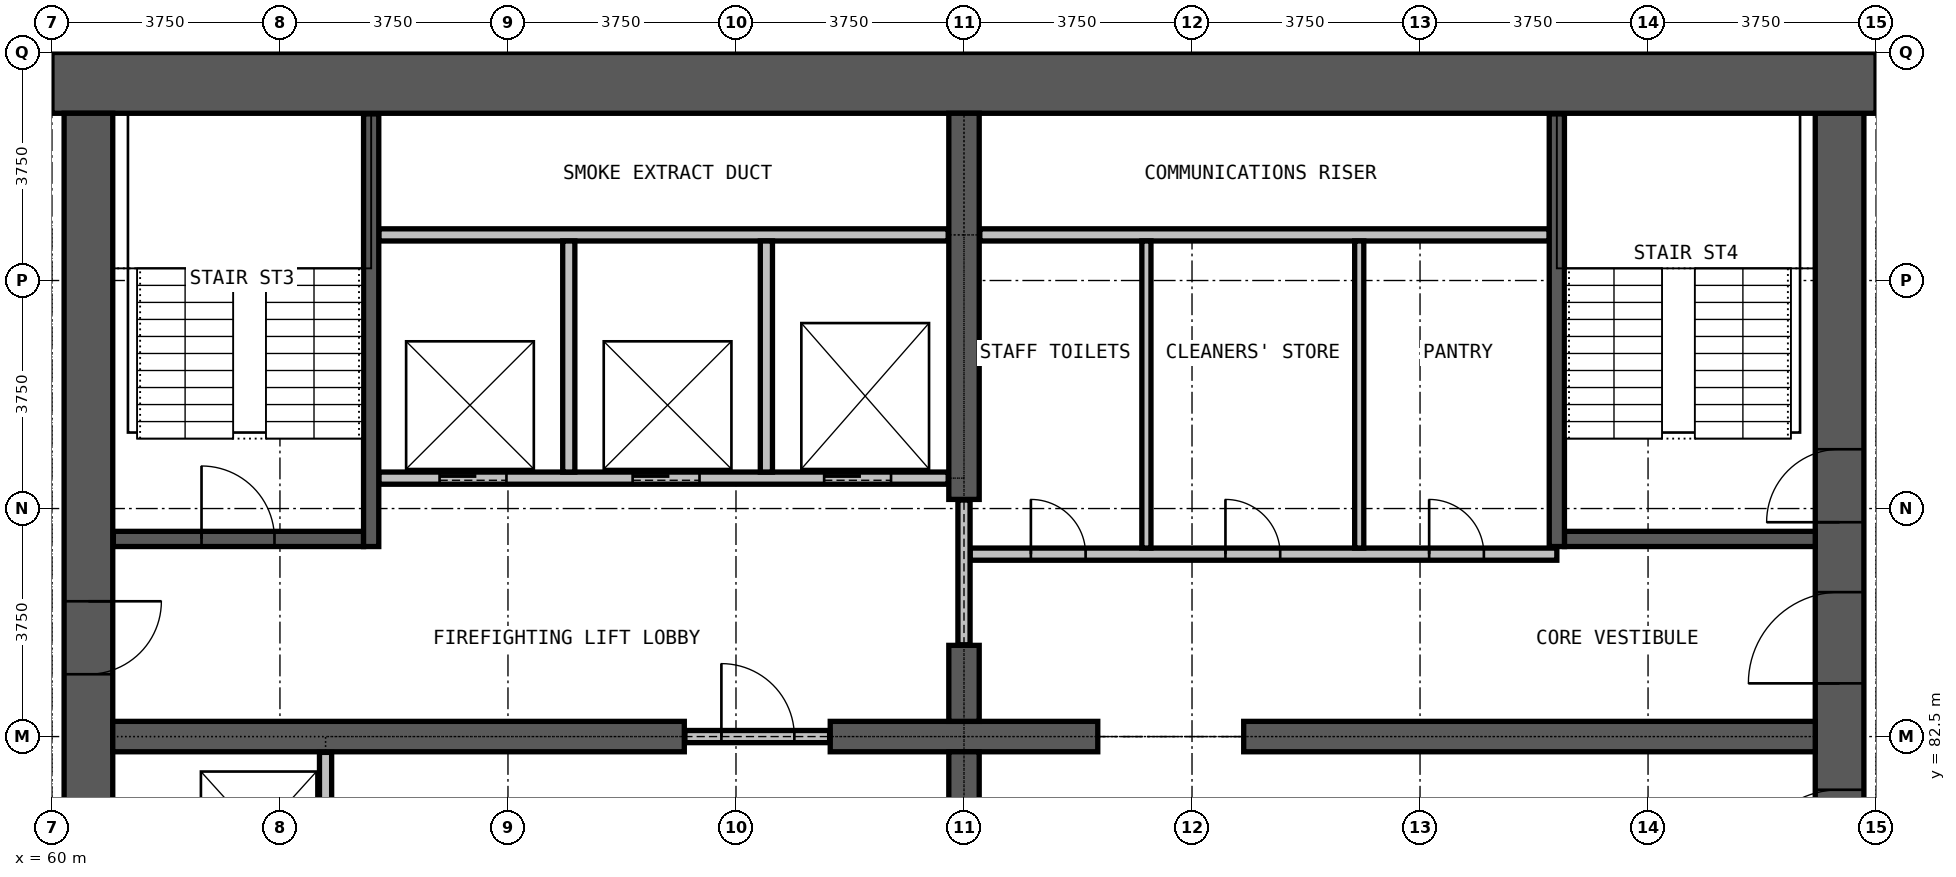
"""IFC4 building model, lengths in metres.
Left out: names, types, materials, properties, quantities, classifications, styles, units other than length and angle.
Written with IfcOpenShell. Run it as: python <this file> out.ifc"""

import sys

from ifc_helpers import new_model, si_unit, direction, frame, frame_2d, origin, place, context, subcontext, project, spatial, rectangle, extrude, element, fill, save


model = new_model("IFC4")
c1 = context("Model", 3, precision=1e-05, world=origin(), true_north=direction((0.0, 1.0)))
c2 = subcontext(c1, "Body", "Model", "MODEL_VIEW")
j1 = project(units=[si_unit("LENGTHUNIT", "METRE"), si_unit("PLANEANGLEUNIT", "RADIAN")], contexts=[c1])
p1 = place(None, origin())
s1 = spatial("IfcSite", under=j1, at=p1, CompositionType="ELEMENT")
p2 = place(p1, origin())
s2 = spatial("IfcBuilding", under=s1, at=p2, CompositionType="ELEMENT")
p3 = place(p2, frame((0.0, 0.0, 125.2)))
s3 = spatial("IfcBuildingStorey", under=s2, at=p3, CompositionType="ELEMENT", Elevation=125.2)
p4 = place(p3, frame((89.4, 72.25, 0.0), z_axis=(0.0, 0.0, 1.0), x_axis=(0.0, 1.0, 0.0)))
e1 = element("IfcWall", 1, at=p4, inside=s3, PredefinedType="SHEAR", context=c2, shape_type="SweptSolid", body=[
    extrude(rectangle(XDim=20.5, YDim=0.8, at=frame_2d((10.25, 0.0))), origin(), (0.0, 0.0, 1.0), 3.6),
])
p5 = place(p4, frame((0.275, 0.0, 0.0)))
e2 = element("IfcOpeningElement", 2, at=p5, cuts=e1, PredefinedType="OPENING", context=c2, shape_type="SweptSolid", body=[
    extrude(rectangle(XDim=1.2, YDim=2.2, at=frame_2d((0.6, 1.1))), frame((0.0, 0.41, 0.0), z_axis=(0.0, -1.0, 0.0), x_axis=(1.0, 0.0, 0.0)), (0.0, 0.0, 1.0), 0.82),
])
p6 = place(p4, frame((13.775, 0.0, 0.0)))
e3 = element("IfcOpeningElement", 3, at=p6, cuts=e1, PredefinedType="OPENING", context=c2, shape_type="SweptSolid", body=[
    extrude(rectangle(XDim=1.2, YDim=2.2, at=frame_2d((0.6, 1.1))), frame((0.0, 0.41, 0.0), z_axis=(0.0, -1.0, 0.0), x_axis=(1.0, 0.0, 0.0)), (0.0, 0.0, 1.0), 0.82),
])
p7 = place(p4, frame((7.875, 0.0, 0.0)))
e4 = element("IfcOpeningElement", 4, at=p7, cuts=e1, PredefinedType="OPENING", context=c2, shape_type="SweptSolid", body=[
    extrude(rectangle(XDim=1.5, YDim=2.2, at=frame_2d((0.75, 1.1))), frame((0.0, 0.41, 0.0), z_axis=(0.0, -1.0, 0.0), x_axis=(1.0, 0.0, 0.0)), (0.0, 0.0, 1.0), 0.82),
])
p8 = place(p4, frame((11.125, 0.0, 0.0)))
e5 = element("IfcOpeningElement", 5, at=p8, cuts=e1, PredefinedType="OPENING", context=c2, shape_type="SweptSolid", body=[
    extrude(rectangle(XDim=1.5, YDim=2.2, at=frame_2d((0.75, 1.1))), frame((0.0, 0.41, 0.0), z_axis=(0.0, -1.0, 0.0), x_axis=(1.0, 0.0, 0.0)), (0.0, 0.0, 1.0), 0.82),
])
p9 = place(p3, frame((90.0, 93.25, 0.0), z_axis=(0.0, 0.0, 1.0), x_axis=(-1.0, 0.0, 0.0)))
e6 = element("IfcWall", 6, at=p9, inside=s3, PredefinedType="SHEAR", context=c2, shape_type="SweptSolid", body=[
    extrude(rectangle(XDim=30.0, YDim=1.0, at=frame_2d((15.0, 0.0))), origin(), (0.0, 0.0, 1.0), 3.6),
])
p10 = place(p3, frame((60.6, 92.75, 0.0), z_axis=(0.0, 0.0, 1.0), x_axis=(0.0, -1.0, 0.0)))
e7 = element("IfcWall", 7, at=p10, inside=s3, PredefinedType="SHEAR", context=c2, shape_type="SweptSolid", body=[
    extrude(rectangle(XDim=20.5, YDim=0.8, at=frame_2d((10.25, 0.0))), origin(), (0.0, 0.0, 1.0), 3.6),
])
p11 = place(p10, frame((19.025, 0.0, 0.0)))
e8 = element("IfcOpeningElement", 8, at=p11, cuts=e7, PredefinedType="OPENING", context=c2, shape_type="SweptSolid", body=[
    extrude(rectangle(XDim=1.2, YDim=2.2, at=frame_2d((0.6, 1.1))), frame((0.0, 0.41, 0.0), z_axis=(0.0, -1.0, 0.0), x_axis=(1.0, 0.0, 0.0)), (0.0, 0.0, 1.0), 0.82),
])
p12 = place(p10, frame((8.025, 0.0, 0.0)))
e9 = element("IfcOpeningElement", 9, at=p12, cuts=e7, PredefinedType="OPENING", context=c2, shape_type="SweptSolid", body=[
    extrude(rectangle(XDim=1.2, YDim=2.2, at=frame_2d((0.6, 1.1))), frame((0.0, 0.41, 0.0), z_axis=(0.0, -1.0, 0.0), x_axis=(1.0, 0.0, 0.0)), (0.0, 0.0, 1.0), 0.82),
])
p13 = place(p3, frame((61.0, 82.5, 0.0), z_axis=(0.0, 0.0, 1.0), x_axis=(1.0, 0.0, 0.0)))
e10 = element("IfcWall", 10, at=p13, inside=s3, PredefinedType="SHEAR", context=c2, shape_type="SweptSolid", body=[
    extrude(rectangle(XDim=9.4, YDim=0.5, at=frame_2d((4.7, 0.0))), origin(), (0.0, 0.0, 1.0), 3.6),
])
p14 = place(p3, frame((72.8, 82.5, 0.0), z_axis=(0.0, 0.0, 1.0), x_axis=(1.0, 0.0, 0.0)))
e11 = element("IfcWall", 11, at=p14, inside=s3, PredefinedType="SHEAR", context=c2, shape_type="SweptSolid", body=[
    extrude(rectangle(XDim=4.4, YDim=0.5, at=frame_2d((2.2, 0.0))), origin(), (0.0, 0.0, 1.0), 3.6),
])
p15 = place(p3, frame((79.6, 82.5, 0.0), z_axis=(0.0, 0.0, 1.0), x_axis=(1.0, 0.0, 0.0)))
e12 = element("IfcWall", 12, at=p15, inside=s3, PredefinedType="SHEAR", context=c2, shape_type="SweptSolid", body=[
    extrude(rectangle(XDim=9.4, YDim=0.5, at=frame_2d((4.7, 0.0))), origin(), (0.0, 0.0, 1.0), 3.6),
])
for number, where, z_axis, x_axis in (
    (13, (75.0, 81.0, 0.0), (0.0, 0.0, 1.0), (0.0, 1.0, 0.0)),
    (14, (75.0, 82.75, 0.0), (0.0, 0.0, 1.0), (0.0, 1.0, 0.0)),
):
    element("IfcWall", number, at=place(p3, frame(where, z_axis=z_axis, x_axis=x_axis)), inside=s3, PredefinedType="SHEAR", context=c2, shape_type="SweptSolid", body=[
        extrude(rectangle(XDim=1.25, YDim=0.5, at=frame_2d((0.625, 0.0))), origin(), (0.0, 0.0, 1.0), 3.6),
    ])
p16 = place(p3, frame((75.0, 86.4, 0.0), z_axis=(0.0, 0.0, 1.0), x_axis=(0.0, 1.0, 0.0)))
e15 = element("IfcWall", 15, at=p16, inside=s3, PredefinedType="SHEAR", context=c2, shape_type="SweptSolid", body=[
    extrude(rectangle(XDim=6.35, YDim=0.5, at=frame_2d((3.175, 0.0))), origin(), (0.0, 0.0, 1.0), 3.6),
])
p17 = place(p3, frame((70.41, 82.5, 0.0), z_axis=(0.0, 0.0, 1.0), x_axis=(1.0, 0.0, 0.0)))
e16 = element("IfcWall", 16, at=p17, inside=s3, PredefinedType="PARTITIONING", context=c2, shape_type="SweptSolid", body=[
    extrude(rectangle(XDim=2.38, YDim=0.2, at=frame_2d((1.19, 0.0))), origin(), (0.0, 0.0, 1.0), 2.4),
])
p18 = place(p17, frame((0.6, 0.0, 0.0)))
e17 = element("IfcOpeningElement", 17, at=p18, cuts=e16, PredefinedType="OPENING", context=c2, shape_type="SweptSolid", body=[
    extrude(rectangle(XDim=1.2, YDim=2.2, at=frame_2d((0.6, 1.1))), frame((0.0, 0.11, 0.0), z_axis=(0.0, -1.0, 0.0), x_axis=(1.0, 0.0, 0.0)), (0.0, 0.0, 1.0), 0.22),
])
p19 = place(p3, frame((75.1, 85.5, 0.0), z_axis=(0.0, 0.0, 1.0), x_axis=(1.0, 0.0, 0.0)))
e18 = element("IfcWall", 18, at=p19, inside=s3, PredefinedType="PARTITIONING", context=c2, shape_type="SweptSolid", body=[
    extrude(rectangle(XDim=9.65, YDim=0.2, at=frame_2d((4.825, 0.0))), origin(), (0.0, 0.0, 1.0), 3.3),
])
p20 = place(p19, frame((1.0, 0.0, 0.0)))
e19 = element("IfcOpeningElement", 19, at=p20, cuts=e18, PredefinedType="OPENING", context=c2, shape_type="SweptSolid", body=[
    extrude(rectangle(XDim=0.9, YDim=2.2, at=frame_2d((0.45, 1.1))), frame((0.0, 0.11, 0.0), z_axis=(0.0, -1.0, 0.0), x_axis=(1.0, 0.0, 0.0)), (0.0, 0.0, 1.0), 0.22),
])
p21 = place(p19, frame((4.2, 0.0, 0.0)))
e20 = element("IfcOpeningElement", 20, at=p21, cuts=e18, PredefinedType="OPENING", context=c2, shape_type="SweptSolid", body=[
    extrude(rectangle(XDim=0.9, YDim=2.2, at=frame_2d((0.45, 1.1))), frame((0.0, 0.11, 0.0), z_axis=(0.0, -1.0, 0.0), x_axis=(1.0, 0.0, 0.0)), (0.0, 0.0, 1.0), 0.22),
])
p22 = place(p19, frame((7.55, 0.0, 0.0)))
e21 = element("IfcOpeningElement", 21, at=p22, cuts=e18, PredefinedType="OPENING", context=c2, shape_type="SweptSolid", body=[
    extrude(rectangle(XDim=0.9, YDim=2.2, at=frame_2d((0.45, 1.1))), frame((0.0, 0.11, 0.0), z_axis=(0.0, -1.0, 0.0), x_axis=(1.0, 0.0, 0.0)), (0.0, 0.0, 1.0), 0.22),
])
p23 = place(p3, frame((75.26, 90.75, 0.0), z_axis=(0.0, 0.0, 1.0), x_axis=(1.0, 0.0, 0.0)))
e22 = element("IfcWall", 22, at=p23, inside=s3, PredefinedType="PARTITIONING", context=c2, shape_type="SweptSolid", body=[
    extrude(rectangle(XDim=9.365, YDim=0.2, at=frame_2d((4.683, 0.0))), origin(), (0.0, 0.0, 1.0), 3.3),
])
p24 = place(p3, frame((75.0, 84.01, 0.0), z_axis=(0.0, 0.0, 1.0), x_axis=(0.0, 1.0, 0.0)))
e23 = element("IfcWall", 23, at=p24, inside=s3, PredefinedType="PARTITIONING", context=c2, shape_type="SweptSolid", body=[
    extrude(rectangle(XDim=2.38, YDim=0.2, at=frame_2d((1.19, 0.0))), origin(), (0.0, 0.0, 1.0), 2.4),
])
for number, where, z_axis, x_axis in (
    (24, (78.0, 85.6, 0.0), (0.0, 0.0, 1.0), (0.0, 1.0, 0.0)),
    (25, (81.5, 85.6, 0.0), (0.0, 0.0, 1.0), (0.0, 1.0, 0.0)),
):
    element("IfcWall", number, at=place(p3, frame(where, z_axis=z_axis, x_axis=x_axis)), inside=s3, PredefinedType="PARTITIONING", context=c2, shape_type="SweptSolid", body=[
        extrude(rectangle(XDim=5.05, YDim=0.15, at=frame_2d((2.525, 0.0))), origin(), (0.0, 0.0, 1.0), 3.3),
    ])
p25 = place(p3, frame((65.375, 86.75, 0.0), z_axis=(0.0, 0.0, 1.0), x_axis=(1.0, 0.0, 0.0)))
e26 = element("IfcWall", 26, at=p25, inside=s3, PredefinedType="PARTITIONING", context=c2, shape_type="SweptSolid", body=[
    extrude(rectangle(XDim=9.365, YDim=0.2, at=frame_2d((4.683, 0.0))), origin(), (0.0, 0.0, 1.0), 3.3),
])
p26 = place(p25, frame((1.0, 0.0, 0.0)))
e27 = element("IfcOpeningElement", 27, at=p26, cuts=e26, PredefinedType="OPENING", context=c2, shape_type="SweptSolid", body=[
    extrude(rectangle(XDim=1.1, YDim=2.2, at=frame_2d((0.55, 1.1))), frame((0.0, 0.11, 0.0), z_axis=(0.0, -1.0, 0.0), x_axis=(1.0, 0.0, 0.0)), (0.0, 0.0, 1.0), 0.22),
])
p27 = place(p25, frame((4.175, 0.0, 0.0)))
e28 = element("IfcOpeningElement", 28, at=p27, cuts=e26, PredefinedType="OPENING", context=c2, shape_type="SweptSolid", body=[
    extrude(rectangle(XDim=1.1, YDim=2.2, at=frame_2d((0.55, 1.1))), frame((0.0, 0.11, 0.0), z_axis=(0.0, -1.0, 0.0), x_axis=(1.0, 0.0, 0.0)), (0.0, 0.0, 1.0), 0.22),
])
p28 = place(p25, frame((7.325, 0.0, 0.0)))
e29 = element("IfcOpeningElement", 29, at=p28, cuts=e26, PredefinedType="OPENING", context=c2, shape_type="SweptSolid", body=[
    extrude(rectangle(XDim=1.1, YDim=2.2, at=frame_2d((0.55, 1.1))), frame((0.0, 0.11, 0.0), z_axis=(0.0, -1.0, 0.0), x_axis=(1.0, 0.0, 0.0)), (0.0, 0.0, 1.0), 0.22),
])
p29 = place(p3, frame((65.375, 90.75, 0.0), z_axis=(0.0, 0.0, 1.0), x_axis=(1.0, 0.0, 0.0)))
e30 = element("IfcWall", 30, at=p29, inside=s3, PredefinedType="PARTITIONING", context=c2, shape_type="SweptSolid", body=[
    extrude(rectangle(XDim=9.365, YDim=0.2, at=frame_2d((4.683, 0.0))), origin(), (0.0, 0.0, 1.0), 3.3),
])
p30 = place(p3, frame((64.5, 79.375, 0.0), z_axis=(0.0, 0.0, 1.0), x_axis=(0.0, 1.0, 0.0)))
e31 = element("IfcWall", 31, at=p30, inside=s3, PredefinedType="PARTITIONING", context=c2, shape_type="SweptSolid", body=[
    extrude(rectangle(XDim=2.865, YDim=0.2, at=frame_2d((1.433, 0.0))), origin(), (0.0, 0.0, 1.0), 3.3),
])
for number, where, z_axis, x_axis in (
    (32, (68.5, 86.85, 0.0), (0.0, 0.0, 1.0), (0.0, 1.0, 0.0)),
    (33, (71.75, 86.85, 0.0), (0.0, 0.0, 1.0), (0.0, 1.0, 0.0)),
):
    element("IfcWall", number, at=place(p3, frame(where, z_axis=z_axis, x_axis=x_axis)), inside=s3, PredefinedType="PARTITIONING", context=c2, shape_type="SweptSolid", body=[
        extrude(rectangle(XDim=3.8, YDim=0.2, at=frame_2d((1.9, 0.0))), origin(), (0.0, 0.0, 1.0), 3.3),
    ])
p31 = place(p3, frame((61.01, 85.75, 0.0), z_axis=(0.0, 0.0, 1.0), x_axis=(1.0, 0.0, 0.0)))
e34 = element("IfcWall", 34, at=p31, inside=s3, PredefinedType="PARTITIONING", context=c2, shape_type="SweptSolid", body=[
    extrude(rectangle(XDim=4.115, YDim=0.25, at=frame_2d((2.058, 0.0))), origin(), (0.0, 0.0, 1.0), 3.3),
])
p32 = place(p31, frame((1.45, 0.0, 0.0)))
e35 = element("IfcOpeningElement", 35, at=p32, cuts=e34, PredefinedType="OPENING", context=c2, shape_type="SweptSolid", body=[
    extrude(rectangle(XDim=1.2, YDim=2.2, at=frame_2d((0.6, 1.1))), frame((0.0, 0.135, 0.0), z_axis=(0.0, -1.0, 0.0), x_axis=(1.0, 0.0, 0.0)), (0.0, 0.0, 1.0), 0.27),
])
p33 = place(p3, frame((84.875, 85.75, 0.0), z_axis=(0.0, 0.0, 1.0), x_axis=(1.0, 0.0, 0.0)))
e36 = element("IfcWall", 36, at=p33, inside=s3, PredefinedType="PARTITIONING", context=c2, shape_type="SweptSolid", body=[
    extrude(rectangle(XDim=4.125, YDim=0.25, at=frame_2d((2.062, 0.0))), origin(), (0.0, 0.0, 1.0), 3.3),
])
for number, where, z_axis, x_axis in (
    (37, (65.25, 85.625, 0.0), (0.0, 0.0, 1.0), (0.0, 1.0, 0.0)),
    (38, (84.75, 85.625, 0.0), (0.0, 0.0, 1.0), (0.0, 1.0, 0.0)),
):
    element("IfcWall", number, at=place(p3, frame(where, z_axis=z_axis, x_axis=x_axis)), inside=s3, PredefinedType="PARTITIONING", context=c2, shape_type="SweptSolid", body=[
        extrude(rectangle(XDim=7.115, YDim=0.25, at=frame_2d((3.558, 0.0))), origin(), (0.0, 0.0, 1.0), 3.3),
    ])
p34 = place(p26, origin())
e39 = element("IfcDoor", 39, at=p34, inside=s3, OperationType="DOUBLE_DOOR_SLIDING", PredefinedType="DOOR", context=c2, shape_type="SweptSolid", body=[
    extrude(rectangle(XDim=1.1, YDim=2.2, at=frame_2d((0.55, 1.1))), frame((0.0, 0.025, 0.0), z_axis=(0.0, -1.0, 0.0), x_axis=(1.0, 0.0, 0.0)), (0.0, 0.0, 1.0), 0.05),
])
fill(e27, e39)
p35 = place(p27, origin())
e40 = element("IfcDoor", 40, at=p35, inside=s3, OperationType="DOUBLE_DOOR_SLIDING", PredefinedType="DOOR", context=c2, shape_type="SweptSolid", body=[
    extrude(rectangle(XDim=1.1, YDim=2.2, at=frame_2d((0.55, 1.1))), frame((0.0, 0.025, 0.0), z_axis=(0.0, -1.0, 0.0), x_axis=(1.0, 0.0, 0.0)), (0.0, 0.0, 1.0), 0.05),
])
fill(e28, e40)
p36 = place(p28, origin())
e41 = element("IfcDoor", 41, at=p36, inside=s3, OperationType="DOUBLE_DOOR_SLIDING", PredefinedType="DOOR", context=c2, shape_type="SweptSolid", body=[
    extrude(rectangle(XDim=1.1, YDim=2.2, at=frame_2d((0.55, 1.1))), frame((0.0, 0.025, 0.0), z_axis=(0.0, -1.0, 0.0), x_axis=(1.0, 0.0, 0.0)), (0.0, 0.0, 1.0), 0.05),
])
fill(e29, e41)
p37 = place(p18, origin())
e42 = element("IfcDoor", 42, at=p37, inside=s3, OperationType="SINGLE_SWING_LEFT", PredefinedType="DOOR", context=c2, shape_type="SweptSolid", body=[
    extrude(rectangle(XDim=1.2, YDim=2.2, at=frame_2d((0.6, 1.1))), frame((0.0, 0.025, 0.0), z_axis=(0.0, -1.0, 0.0), x_axis=(1.0, 0.0, 0.0)), (0.0, 0.0, 1.0), 0.05),
])
fill(e17, e42)
p38 = place(p32, origin())
e43 = element("IfcDoor", 43, at=p38, inside=s3, OperationType="SINGLE_SWING_LEFT", PredefinedType="DOOR", context=c2, shape_type="SweptSolid", body=[
    extrude(rectangle(XDim=1.2, YDim=2.2, at=frame_2d((0.6, 1.1))), frame((0.0, 0.025, 0.0), z_axis=(0.0, -1.0, 0.0), x_axis=(1.0, 0.0, 0.0)), (0.0, 0.0, 1.0), 0.05),
])
fill(e35, e43)
p39 = place(p6, origin())
e44 = element("IfcDoor", 44, at=p39, inside=s3, OperationType="SINGLE_SWING_RIGHT", PredefinedType="DOOR", context=c2, shape_type="SweptSolid", body=[
    extrude(rectangle(XDim=1.2, YDim=2.2, at=frame_2d((0.6, 1.1))), frame((0.0, 0.025, 0.0), z_axis=(0.0, -1.0, 0.0), x_axis=(1.0, 0.0, 0.0)), (0.0, 0.0, 1.0), 0.05),
])
fill(e3, e44)
p40 = place(p7, origin())
e45 = element("IfcDoor", 45, at=p40, inside=s3, OperationType="DOUBLE_DOOR_SINGLE_SWING", PredefinedType="DOOR", context=c2, shape_type="SweptSolid", body=[
    extrude(rectangle(XDim=1.5, YDim=2.2, at=frame_2d((0.75, 1.1))), frame((0.0, 0.025, 0.0), z_axis=(0.0, -1.0, 0.0), x_axis=(1.0, 0.0, 0.0)), (0.0, 0.0, 1.0), 0.05),
])
fill(e4, e45)
p41 = place(p12, origin())
e46 = element("IfcDoor", 46, at=p41, inside=s3, OperationType="SINGLE_SWING_RIGHT", PredefinedType="DOOR", context=c2, shape_type="SweptSolid", body=[
    extrude(rectangle(XDim=1.2, YDim=2.2, at=frame_2d((0.6, 1.1))), frame((0.0, 0.025, 0.0), z_axis=(0.0, -1.0, 0.0), x_axis=(1.0, 0.0, 0.0)), (0.0, 0.0, 1.0), 0.05),
])
fill(e9, e46)
p42 = place(p8, origin())
e47 = element("IfcDoor", 47, at=p42, inside=s3, OperationType="DOUBLE_DOOR_SINGLE_SWING", PredefinedType="DOOR", context=c2, shape_type="SweptSolid", body=[
    extrude(rectangle(XDim=1.5, YDim=2.2, at=frame_2d((0.75, 1.1))), frame((0.0, 0.025, 0.0), z_axis=(0.0, -1.0, 0.0), x_axis=(1.0, 0.0, 0.0)), (0.0, 0.0, 1.0), 0.05),
])
fill(e5, e47)
p43 = place(p20, origin())
e48 = element("IfcDoor", 48, at=p43, inside=s3, OperationType="SINGLE_SWING_LEFT", PredefinedType="DOOR", context=c2, shape_type="SweptSolid", body=[
    extrude(rectangle(XDim=0.9, YDim=2.2, at=frame_2d((0.45, 1.1))), frame((0.0, 0.025, 0.0), z_axis=(0.0, -1.0, 0.0), x_axis=(1.0, 0.0, 0.0)), (0.0, 0.0, 1.0), 0.05),
])
fill(e19, e48)
p44 = place(p21, origin())
e49 = element("IfcDoor", 49, at=p44, inside=s3, OperationType="SINGLE_SWING_LEFT", PredefinedType="DOOR", context=c2, shape_type="SweptSolid", body=[
    extrude(rectangle(XDim=0.9, YDim=2.2, at=frame_2d((0.45, 1.1))), frame((0.0, 0.025, 0.0), z_axis=(0.0, -1.0, 0.0), x_axis=(1.0, 0.0, 0.0)), (0.0, 0.0, 1.0), 0.05),
])
fill(e20, e49)
p45 = place(p22, origin())
e50 = element("IfcDoor", 50, at=p45, inside=s3, OperationType="SINGLE_SWING_LEFT", PredefinedType="DOOR", context=c2, shape_type="SweptSolid", body=[
    extrude(rectangle(XDim=0.9, YDim=2.2, at=frame_2d((0.45, 1.1))), frame((0.0, 0.025, 0.0), z_axis=(0.0, -1.0, 0.0), x_axis=(1.0, 0.0, 0.0)), (0.0, 0.0, 1.0), 0.05),
])
fill(e21, e50)
save(model, sys.argv[1])
